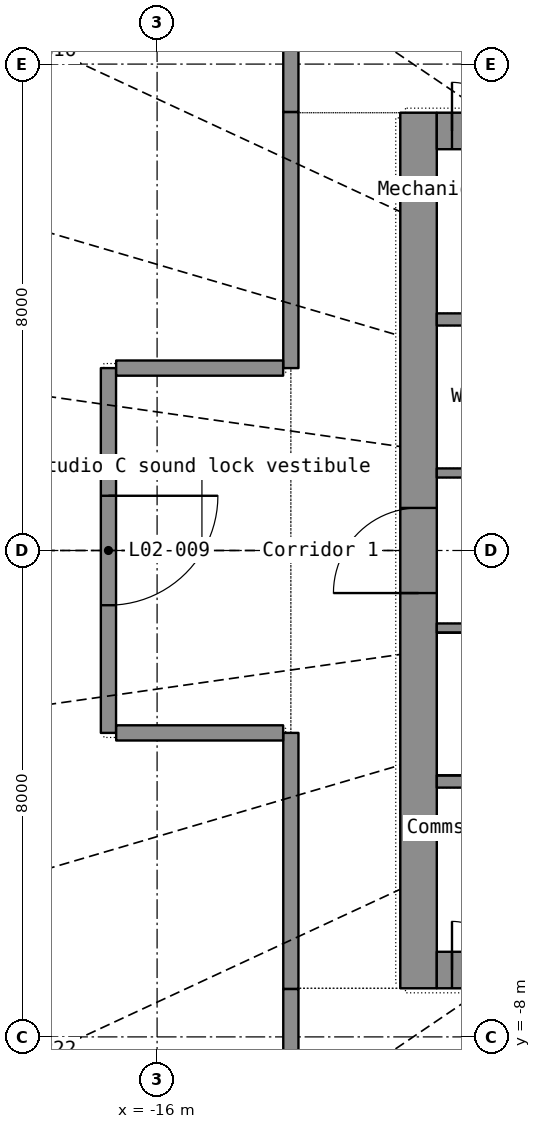
"""IFC4 building model, lengths in metres.
Left out: names, types, materials, properties, quantities, classifications, styles, units other than length and angle.
Written with IfcOpenShell. Run it as: python <this file> out.ifc"""

import sys

from ifc_helpers import new_model, si_unit, direction, frame, frame_2d, origin, place, context, subcontext, project, spatial, rectangle, extrude, element, fill, save


model = new_model("IFC4")
c1 = context("Model", 3, precision=1e-05, world=origin(), true_north=direction((0.0, 1.0)))
c2 = subcontext(c1, "Body", "Model", "MODEL_VIEW")
j1 = project(units=[si_unit("LENGTHUNIT", "METRE"), si_unit("PLANEANGLEUNIT", "RADIAN")], contexts=[c1])
p1 = place(None, origin())
s1 = spatial("IfcSite", under=j1, at=p1, CompositionType="ELEMENT")
p2 = place(p1, origin())
s2 = spatial("IfcBuilding", under=s1, at=p2, CompositionType="ELEMENT")
p3 = place(p2, frame((0.0, 0.0, 13.5)))
s3 = spatial("IfcBuildingStorey", under=s2, at=p3, CompositionType="ELEMENT", Elevation=13.5)
p4 = place(p3, frame((-11.7, -7.2, 0.0), z_axis=(0.0, 0.0, 1.0), x_axis=(0.0, 1.0, 0.0)))
e1 = element("IfcWall", 1, at=p4, inside=s3, PredefinedType="SHEAR", context=c2, shape_type="SweptSolid", body=[
    extrude(rectangle(XDim=14.4, YDim=0.6, at=frame_2d((7.2, 0.0))), origin(), (0.0, 0.0, 1.0), 6.1),
])
p5 = place(p4, frame((6.5, 0.0, 0.0)))
e2 = element("IfcOpeningElement", 2, at=p5, cuts=e1, PredefinedType="OPENING", context=c2, shape_type="SweptSolid", body=[
    extrude(rectangle(XDim=1.4, YDim=2.2, at=frame_2d((0.7, 1.1))), frame((0.0, 0.31, 0.0), z_axis=(0.0, -1.0, 0.0), x_axis=(1.0, 0.0, 0.0)), (0.0, 0.0, 1.0), 0.62),
])
p6 = place(p3, frame((-11.4, -6.9, 0.0), z_axis=(0.0, 0.0, 1.0), x_axis=(1.0, 0.0, 0.0)))
e3 = element("IfcWall", 3, at=p6, inside=s3, PredefinedType="SHEAR", context=c2, shape_type="SweptSolid", body=[
    extrude(rectangle(XDim=22.8, YDim=0.6, at=frame_2d((11.4, 0.0))), origin(), (0.0, 0.0, 1.0), 6.1),
])
p7 = place(p6, frame((1.85, 0.0, 0.0)))
e4 = element("IfcOpeningElement", 4, at=p7, cuts=e3, PredefinedType="OPENING", context=c2, shape_type="SweptSolid", body=[
    extrude(rectangle(XDim=1.1, YDim=2.2, at=frame_2d((0.55, 1.1))), frame((0.0, 0.31, 0.0), z_axis=(0.0, -1.0, 0.0), x_axis=(1.0, 0.0, 0.0)), (0.0, 0.0, 1.0), 0.62),
])
p8 = place(p6, frame((3.85, 0.0, 0.0)))
e5 = element("IfcOpeningElement", 5, at=p8, cuts=e3, PredefinedType="OPENING", context=c2, shape_type="SweptSolid", body=[
    extrude(rectangle(XDim=1.1, YDim=2.2, at=frame_2d((0.55, 1.1))), frame((0.0, 0.31, 0.0), z_axis=(0.0, -1.0, 0.0), x_axis=(1.0, 0.0, 0.0)), (0.0, 0.0, 1.0), 0.62),
])
p9 = place(p6, frame((5.85, 0.0, 0.0)))
e6 = element("IfcOpeningElement", 6, at=p9, cuts=e3, PredefinedType="OPENING", context=c2, shape_type="SweptSolid", body=[
    extrude(rectangle(XDim=1.1, YDim=2.2, at=frame_2d((0.55, 1.1))), frame((0.0, 0.31, 0.0), z_axis=(0.0, -1.0, 0.0), x_axis=(1.0, 0.0, 0.0)), (0.0, 0.0, 1.0), 0.62),
])
p10 = place(p6, frame((7.85, 0.0, 0.0)))
e7 = element("IfcOpeningElement", 7, at=p10, cuts=e3, PredefinedType="OPENING", context=c2, shape_type="SweptSolid", body=[
    extrude(rectangle(XDim=1.1, YDim=2.2, at=frame_2d((0.55, 1.1))), frame((0.0, 0.31, 0.0), z_axis=(0.0, -1.0, 0.0), x_axis=(1.0, 0.0, 0.0)), (0.0, 0.0, 1.0), 0.62),
])
p11 = place(p6, frame((9.85, 0.0, 0.0)))
e8 = element("IfcOpeningElement", 8, at=p11, cuts=e3, PredefinedType="OPENING", context=c2, shape_type="SweptSolid", body=[
    extrude(rectangle(XDim=1.1, YDim=2.2, at=frame_2d((0.55, 1.1))), frame((0.0, 0.31, 0.0), z_axis=(0.0, -1.0, 0.0), x_axis=(1.0, 0.0, 0.0)), (0.0, 0.0, 1.0), 0.62),
])
p12 = place(p6, frame((11.85, 0.0, 0.0)))
e9 = element("IfcOpeningElement", 9, at=p12, cuts=e3, PredefinedType="OPENING", context=c2, shape_type="SweptSolid", body=[
    extrude(rectangle(XDim=1.1, YDim=2.2, at=frame_2d((0.55, 1.1))), frame((0.0, 0.31, 0.0), z_axis=(0.0, -1.0, 0.0), x_axis=(1.0, 0.0, 0.0)), (0.0, 0.0, 1.0), 0.62),
])
p13 = place(p6, frame((13.85, 0.0, 0.0)))
e10 = element("IfcOpeningElement", 10, at=p13, cuts=e3, PredefinedType="OPENING", context=c2, shape_type="SweptSolid", body=[
    extrude(rectangle(XDim=1.1, YDim=2.2, at=frame_2d((0.55, 1.1))), frame((0.0, 0.31, 0.0), z_axis=(0.0, -1.0, 0.0), x_axis=(1.0, 0.0, 0.0)), (0.0, 0.0, 1.0), 0.62),
])
p14 = place(p6, frame((15.85, 0.0, 0.0)))
e11 = element("IfcOpeningElement", 11, at=p14, cuts=e3, PredefinedType="OPENING", context=c2, shape_type="SweptSolid", body=[
    extrude(rectangle(XDim=1.1, YDim=2.2, at=frame_2d((0.55, 1.1))), frame((0.0, 0.31, 0.0), z_axis=(0.0, -1.0, 0.0), x_axis=(1.0, 0.0, 0.0)), (0.0, 0.0, 1.0), 0.62),
])
p15 = place(p6, frame((19.85, 0.0, 0.0)))
e12 = element("IfcOpeningElement", 12, at=p15, cuts=e3, PredefinedType="OPENING", context=c2, shape_type="SweptSolid", body=[
    extrude(rectangle(XDim=1.1, YDim=2.2, at=frame_2d((0.55, 1.1))), frame((0.0, 0.31, 0.0), z_axis=(0.0, -1.0, 0.0), x_axis=(1.0, 0.0, 0.0)), (0.0, 0.0, 1.0), 0.62),
])
p16 = place(p6, frame((0.25, 0.0, 0.0)))
e13 = element("IfcOpeningElement", 13, at=p16, cuts=e3, PredefinedType="OPENING", context=c2, shape_type="SweptSolid", body=[
    extrude(rectangle(XDim=0.8, YDim=2.05, at=frame_2d((0.4, 1.025))), frame((0.0, 0.31, 0.0), z_axis=(0.0, -1.0, 0.0), x_axis=(1.0, 0.0, 0.0)), (0.0, 0.0, 1.0), 0.62),
])
p17 = place(p6, frame((21.75, 0.0, 0.0)))
e14 = element("IfcOpeningElement", 14, at=p17, cuts=e3, PredefinedType="OPENING", context=c2, shape_type="SweptSolid", body=[
    extrude(rectangle(XDim=0.8, YDim=2.05, at=frame_2d((0.4, 1.025))), frame((0.0, 0.31, 0.0), z_axis=(0.0, -1.0, 0.0), x_axis=(1.0, 0.0, 0.0)), (0.0, 0.0, 1.0), 0.62),
])
p18 = place(p3, frame((-11.4, 6.9, 0.0), z_axis=(0.0, 0.0, 1.0), x_axis=(1.0, 0.0, 0.0)))
e15 = element("IfcWall", 15, at=p18, inside=s3, PredefinedType="SHEAR", context=c2, shape_type="SweptSolid", body=[
    extrude(rectangle(XDim=22.8, YDim=0.6, at=frame_2d((11.4, 0.0))), origin(), (0.0, 0.0, 1.0), 6.1),
])
p19 = place(p18, frame((1.85, 0.0, 0.0)))
e16 = element("IfcOpeningElement", 16, at=p19, cuts=e15, PredefinedType="OPENING", context=c2, shape_type="SweptSolid", body=[
    extrude(rectangle(XDim=1.1, YDim=2.2, at=frame_2d((0.55, 1.1))), frame((0.0, 0.31, 0.0), z_axis=(0.0, -1.0, 0.0), x_axis=(1.0, 0.0, 0.0)), (0.0, 0.0, 1.0), 0.62),
])
p20 = place(p18, frame((9.95, 0.0, 0.0)))
e17 = element("IfcOpeningElement", 17, at=p20, cuts=e15, PredefinedType="OPENING", context=c2, shape_type="SweptSolid", body=[
    extrude(rectangle(XDim=0.9, YDim=2.1, at=frame_2d((0.45, 1.05))), frame((0.0, 0.31, 0.0), z_axis=(0.0, -1.0, 0.0), x_axis=(1.0, 0.0, 0.0)), (0.0, 0.0, 1.0), 0.62),
])
p21 = place(p18, frame((17.95, 0.0, 0.0)))
e18 = element("IfcOpeningElement", 18, at=p21, cuts=e15, PredefinedType="OPENING", context=c2, shape_type="SweptSolid", body=[
    extrude(rectangle(XDim=0.9, YDim=2.1, at=frame_2d((0.45, 1.05))), frame((0.0, 0.31, 0.0), z_axis=(0.0, -1.0, 0.0), x_axis=(1.0, 0.0, 0.0)), (0.0, 0.0, 1.0), 0.62),
])
p22 = place(p18, frame((0.25, 0.0, 0.0)))
e19 = element("IfcOpeningElement", 19, at=p22, cuts=e15, PredefinedType="OPENING", context=c2, shape_type="SweptSolid", body=[
    extrude(rectangle(XDim=0.8, YDim=2.05, at=frame_2d((0.4, 1.025))), frame((0.0, 0.31, 0.0), z_axis=(0.0, -1.0, 0.0), x_axis=(1.0, 0.0, 0.0)), (0.0, 0.0, 1.0), 0.62),
])
p23 = place(p18, frame((21.75, 0.0, 0.0)))
e20 = element("IfcOpeningElement", 20, at=p23, cuts=e15, PredefinedType="OPENING", context=c2, shape_type="SweptSolid", body=[
    extrude(rectangle(XDim=0.8, YDim=2.05, at=frame_2d((0.4, 1.025))), frame((0.0, 0.31, 0.0), z_axis=(0.0, -1.0, 0.0), x_axis=(1.0, 0.0, 0.0)), (0.0, 0.0, 1.0), 0.62),
])
for number, where, z_axis, x_axis in (
    (21, (-11.4, -3.8, 0.0), (0.0, 0.0, 1.0), (1.0, 0.0, 0.0)),
    (22, (-11.4, 3.8, 0.0), (0.0, 0.0, 1.0), (1.0, 0.0, 0.0)),
):
    element("IfcWall", number, at=place(p3, frame(where, z_axis=z_axis, x_axis=x_axis)), inside=s3, PredefinedType="SHEAR", context=c2, shape_type="SweptSolid", body=[
        extrude(rectangle(XDim=22.8, YDim=0.2, at=frame_2d((11.4, 0.0))), origin(), (0.0, 0.0, 1.0), 6.1),
    ])
p24 = place(p3, frame((-11.4, -1.275, 0.0), z_axis=(0.0, 0.0, 1.0), x_axis=(1.0, 0.0, 0.0)))
e23 = element("IfcWall", 23, at=p24, inside=s3, PredefinedType="SHEAR", context=c2, shape_type="SweptSolid", body=[
    extrude(rectangle(XDim=8.4, YDim=0.15, at=frame_2d((4.2, 0.0))), origin(), (0.0, 0.0, 1.0), 6.1),
])
p25 = place(p24, frame((5.25, 0.0, 0.0)))
e24 = element("IfcOpeningElement", 24, at=p25, cuts=e23, PredefinedType="OPENING", context=c2, shape_type="SweptSolid", body=[
    extrude(rectangle(XDim=1.1, YDim=2.15, at=frame_2d((0.55, 1.075))), frame((0.0, 0.085, 0.0), z_axis=(0.0, -1.0, 0.0), x_axis=(1.0, 0.0, 0.0)), (0.0, 0.0, 1.0), 0.17),
])
p26 = place(p24, frame((7.05, 0.0, 0.0)))
e25 = element("IfcOpeningElement", 25, at=p26, cuts=e23, PredefinedType="OPENING", context=c2, shape_type="SweptSolid", body=[
    extrude(rectangle(XDim=0.9, YDim=2.1, at=frame_2d((0.45, 1.05))), frame((0.0, 0.085, 0.0), z_axis=(0.0, -1.0, 0.0), x_axis=(1.0, 0.0, 0.0)), (0.0, 0.0, 1.0), 0.17),
])
p27 = place(p3, frame((-11.4, 1.275, 0.0), z_axis=(0.0, 0.0, 1.0), x_axis=(1.0, 0.0, 0.0)))
e26 = element("IfcWall", 26, at=p27, inside=s3, PredefinedType="PARTITIONING", context=c2, shape_type="SweptSolid", body=[
    extrude(rectangle(XDim=8.4, YDim=0.15, at=frame_2d((4.2, 0.0))), origin(), (0.0, 0.0, 1.0), 6.1),
])
p28 = place(p27, frame((0.768, 0.0, 0.0)))
e27 = element("IfcOpeningElement", 27, at=p28, cuts=e26, PredefinedType="OPENING", context=c2, shape_type="SweptSolid", body=[
    extrude(rectangle(XDim=0.85, YDim=2.1, at=frame_2d((0.425, 1.05))), frame((0.0, 0.085, 0.0), z_axis=(0.0, -1.0, 0.0), x_axis=(1.0, 0.0, 0.0)), (0.0, 0.0, 1.0), 0.17),
])
p29 = place(p27, frame((3.302, 0.0, 0.0)))
e28 = element("IfcOpeningElement", 28, at=p29, cuts=e26, PredefinedType="OPENING", context=c2, shape_type="SweptSolid", body=[
    extrude(rectangle(XDim=0.85, YDim=2.1, at=frame_2d((0.425, 1.05))), frame((0.0, 0.085, 0.0), z_axis=(0.0, -1.0, 0.0), x_axis=(1.0, 0.0, 0.0)), (0.0, 0.0, 1.0), 0.17),
])
p30 = place(p27, frame((5.415, 0.0, 0.0)))
e29 = element("IfcOpeningElement", 29, at=p30, cuts=e26, PredefinedType="OPENING", context=c2, shape_type="SweptSolid", body=[
    extrude(rectangle(XDim=0.9, YDim=2.1, at=frame_2d((0.45, 1.05))), frame((0.0, 0.085, 0.0), z_axis=(0.0, -1.0, 0.0), x_axis=(1.0, 0.0, 0.0)), (0.0, 0.0, 1.0), 0.17),
])
p31 = place(p27, frame((7.155, 0.0, 0.0)))
e30 = element("IfcOpeningElement", 30, at=p31, cuts=e26, PredefinedType="OPENING", context=c2, shape_type="SweptSolid", body=[
    extrude(rectangle(XDim=0.9, YDim=2.1, at=frame_2d((0.45, 1.05))), frame((0.0, 0.085, 0.0), z_axis=(0.0, -1.0, 0.0), x_axis=(1.0, 0.0, 0.0)), (0.0, 0.0, 1.0), 0.17),
])
p32 = place(p3, frame((-16.8, 3.0, 0.0), z_axis=(0.0, 0.0, 1.0), x_axis=(0.0, -1.0, 0.0)))
e31 = element("IfcWall", 31, at=p32, inside=s3, PredefinedType="PARTITIONING", context=c2, shape_type="SweptSolid", body=[
    extrude(rectangle(XDim=6.0, YDim=0.25, at=frame_2d((3.0, 0.0))), origin(), (0.0, 0.0, 1.0), 5.1),
])
p33 = place(p32, frame((2.1, 0.0, 0.0)))
e32 = element("IfcOpeningElement", 32, at=p33, cuts=e31, PredefinedType="OPENING", context=c2, shape_type="SweptSolid", body=[
    extrude(rectangle(XDim=1.8, YDim=2.4, at=frame_2d((0.9, 1.2))), frame((0.0, 0.135, 0.0), z_axis=(0.0, -1.0, 0.0), x_axis=(1.0, 0.0, 0.0)), (0.0, 0.0, 1.0), 0.27),
])
for number, where, z_axis, x_axis in (
    (33, (-13.8, -3.0, 0.0), (0.0, 0.0, 1.0), (0.0, -1.0, 0.0)),
    (34, (-13.8, 7.212, 0.0), (0.0, 0.0, 1.0), (0.0, -1.0, 0.0)),
):
    element("IfcWall", number, at=place(p3, frame(where, z_axis=z_axis, x_axis=x_axis)), inside=s3, PredefinedType="PARTITIONING", context=c2, shape_type="SweptSolid", body=[
        extrude(rectangle(XDim=4.212, YDim=0.25, at=frame_2d((2.106, 0.0))), origin(), (0.0, 0.0, 1.0), 5.1),
    ])
for number, where, z_axis, x_axis in (
    (35, (-16.673, -3.0, 0.0), (0.0, 0.0, 1.0), (1.0, 0.0, 0.0)),
    (36, (-13.927, 3.0, 0.0), (0.0, 0.0, 1.0), (-1.0, 0.0, 0.0)),
):
    element("IfcWall", number, at=place(p3, frame(where, z_axis=z_axis, x_axis=x_axis)), inside=s3, PredefinedType="PARTITIONING", context=c2, shape_type="SweptSolid", body=[
        extrude(rectangle(XDim=2.746, YDim=0.25, at=frame_2d((1.373, 0.0))), origin(), (0.0, 0.0, 1.0), 5.1),
    ])
for number, where, z_axis, x_axis in (
    (37, (-13.8, -7.213, 0.0), (0.0, 0.0, 1.0), (0.0, -1.0, 0.0)),
    (38, (-13.8, 9.473, 0.0), (0.0, 0.0, 1.0), (0.0, -1.0, 0.0)),
):
    element("IfcWall", number, at=place(p3, frame(where, z_axis=z_axis, x_axis=x_axis)), inside=s3, PredefinedType="PARTITIONING", context=c2, shape_type="SweptSolid", body=[
        extrude(rectangle(XDim=2.26, YDim=0.25, at=frame_2d((1.13, 0.0))), origin(), (0.0, 0.0, 1.0), 5.1),
    ])
p34 = place(p16, origin())
e39 = element("IfcDoor", 39, at=p34, inside=s3, OperationType="SINGLE_SWING_LEFT", PredefinedType="DOOR", context=c2, shape_type="SweptSolid", body=[
    extrude(rectangle(XDim=0.8, YDim=2.05, at=frame_2d((0.4, 1.025))), frame((0.0, 0.025, 0.0), z_axis=(0.0, -1.0, 0.0), x_axis=(1.0, 0.0, 0.0)), (0.0, 0.0, 1.0), 0.05),
])
fill(e13, e39)
p35 = place(p22, origin())
e40 = element("IfcDoor", 40, at=p35, inside=s3, OperationType="SINGLE_SWING_LEFT", PredefinedType="DOOR", context=c2, shape_type="SweptSolid", body=[
    extrude(rectangle(XDim=0.8, YDim=2.05, at=frame_2d((0.4, 1.025))), frame((0.0, 0.025, 0.0), z_axis=(0.0, -1.0, 0.0), x_axis=(1.0, 0.0, 0.0)), (0.0, 0.0, 1.0), 0.05),
])
fill(e19, e40)
p36 = place(p5, origin())
e41 = element("IfcDoor", 41, at=p36, inside=s3, OperationType="DOUBLE_DOOR_SINGLE_SWING", PredefinedType="DOOR", context=c2, shape_type="SweptSolid", body=[
    extrude(rectangle(XDim=1.4, YDim=2.2, at=frame_2d((0.7, 1.1))), frame((0.0, 0.025, 0.0), z_axis=(0.0, -1.0, 0.0), x_axis=(1.0, 0.0, 0.0)), (0.0, 0.0, 1.0), 0.05),
])
fill(e2, e41)
p37 = place(p33, origin())
e42 = element("IfcDoor", 42, at=p37, inside=s3, OperationType="DOUBLE_DOOR_SINGLE_SWING", PredefinedType="DOOR", context=c2, shape_type="SweptSolid", body=[
    extrude(rectangle(XDim=1.8, YDim=2.4, at=frame_2d((0.9, 1.2))), frame((0.0, 0.025, 0.0), z_axis=(0.0, -1.0, 0.0), x_axis=(1.0, 0.0, 0.0)), (0.0, 0.0, 1.0), 0.05),
])
fill(e32, e42)
save(model, sys.argv[1])
